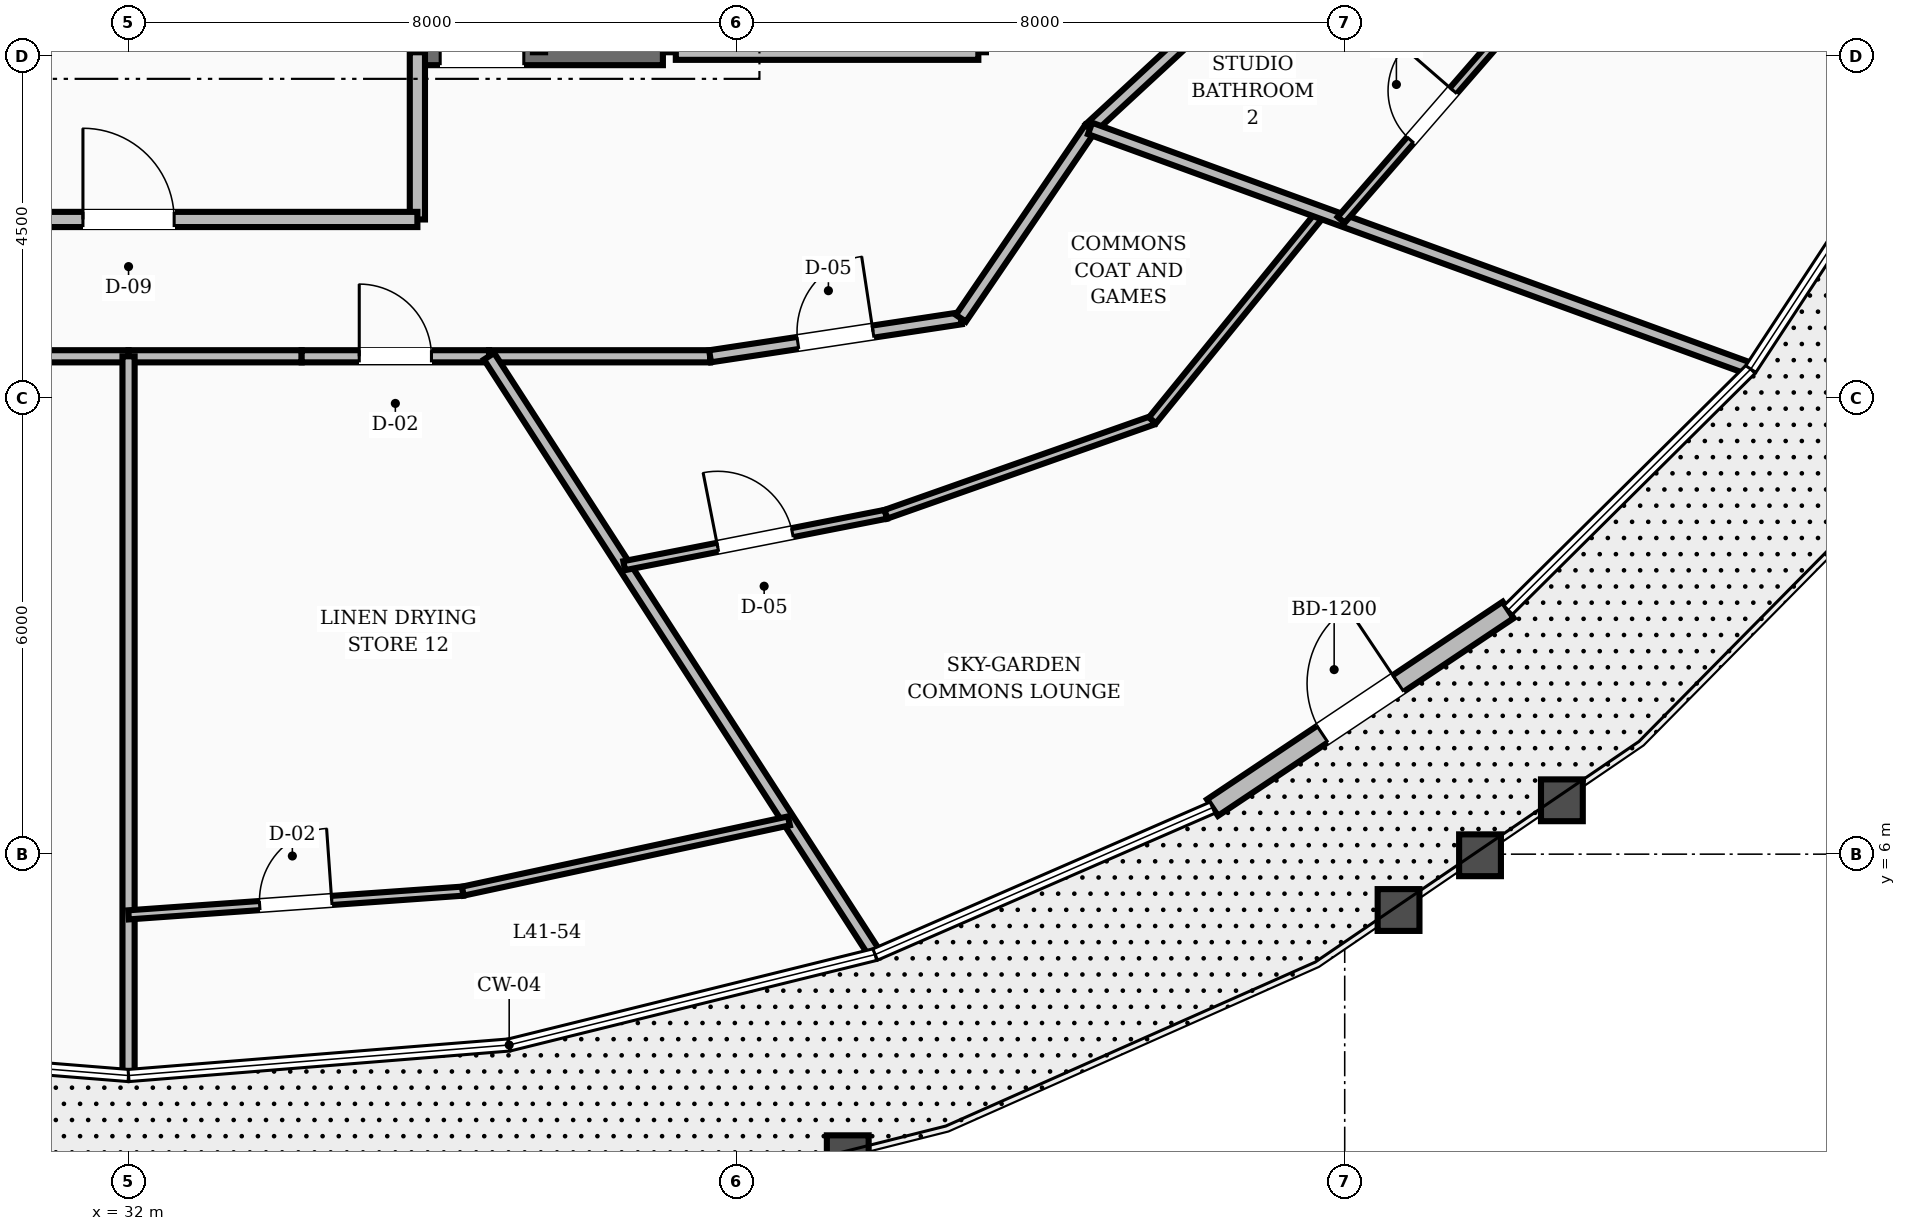
"""IFC4 building model, lengths in metres.
Left out: names, types, materials, properties, quantities, classifications, styles, units other than length and angle.
Written with IfcOpenShell. Run it as: python <this file> out.ifc"""

import sys

from ifc_helpers import new_model, si_unit, direction, frame, frame_2d, origin, place, context, subcontext, project, spatial, rectangle, extrude, element, fill, save


model = new_model("IFC4")
c1 = context("Model", 3, precision=1e-05, world=origin(), true_north=direction((0.0, 1.0)))
c2 = subcontext(c1, "Body", "Model", "MODEL_VIEW")
j1 = project(units=[si_unit("LENGTHUNIT", "METRE"), si_unit("PLANEANGLEUNIT", "RADIAN")], contexts=[c1])
p1 = place(None, origin())
s1 = spatial("IfcSite", under=j1, at=p1, CompositionType="ELEMENT")
p2 = place(p1, origin())
s2 = spatial("IfcBuilding", under=s1, at=p2, CompositionType="ELEMENT")
p3 = place(p2, frame((0.0, 0.0, 160.4)))
s3 = spatial("IfcBuildingStorey", under=s2, at=p3, CompositionType="ELEMENT", Elevation=160.4)
p4 = place(p3, frame((35.8, 16.55, 0.0), z_axis=(0.0, 0.0, 1.0), x_axis=(1.0, 0.0, 0.0)))
e1 = element("IfcWall", 1, at=p4, inside=s3, PredefinedType="SHEAR", context=c2, shape_type="SweptSolid", body=[
    extrude(rectangle(XDim=3.23, YDim=0.34, at=frame_2d((1.615, 0.0))), origin(), (0.0, 0.0, 1.0), 3.6),
])
p5 = place(p4, frame((0.3, 0.0, 0.0)))
e2 = element("IfcOpeningElement", 2, at=p5, cuts=e1, PredefinedType="OPENING", context=c2, shape_type="SweptSolid", body=[
    extrude(rectangle(XDim=1.1, YDim=2.1, at=frame_2d((0.55, 1.05))), frame((0.0, 0.18, 0.0), z_axis=(0.0, -1.0, 0.0), x_axis=(1.0, 0.0, 0.0)), (0.0, 0.0, 1.0), 0.36),
])
p6 = place(p3, frame((46.261, 6.612, 0.0), z_axis=(0.0, 0.0, 1.0), x_axis=(0.831303038132, 0.555819448015, 0.0)))
e3 = element("IfcWall", 3, at=p6, inside=s3, PredefinedType="STANDARD", context=c2, shape_type="SweptSolid", body=[
    extrude(rectangle(XDim=4.679, YDim=0.26, at=frame_2d((2.34, 0.0))), origin(), (0.0, 0.0, 1.0), 2.82),
])
p7 = place(p6, frame((1.74, 0.0, 0.0)))
e4 = element("IfcOpeningElement", 4, at=p7, cuts=e3, PredefinedType="OPENING", context=c2, shape_type="SweptSolid", body=[
    extrude(rectangle(XDim=1.2, YDim=2.15, at=frame_2d((0.6, 1.075))), frame((0.0, 0.14, 0.0), z_axis=(0.0, -1.0, 0.0), x_axis=(1.0, 0.0, 0.0)), (0.0, 0.0, 1.0), 0.28),
])
p8 = place(p3, frame((39.2, 16.55, 0.0), z_axis=(0.0, 0.0, 1.0), x_axis=(1.0, 0.0, 0.0)))
e5 = element("IfcWall", 5, at=p8, inside=s3, PredefinedType="SOLIDWALL", context=c2, shape_type="SweptSolid", body=[
    extrude(rectangle(XDim=3.98, YDim=0.2, at=frame_2d((1.99, 0.0))), origin(), (0.0, 0.0, 1.0), 2.8),
])
p9 = place(p3, frame((35.8, 14.35, 0.0), z_axis=(0.0, 0.0, 1.0), x_axis=(0.0, 1.0, 0.0)))
e6 = element("IfcWall", 6, at=p9, inside=s3, PredefinedType="SOLIDWALL", context=c2, shape_type="SweptSolid", body=[
    extrude(rectangle(XDim=2.2, YDim=0.2, at=frame_2d((1.1, 0.0))), origin(), (0.0, 0.0, 1.0), 2.8),
])
p10 = place(p3, frame((28.2, 14.35, 0.0), z_axis=(0.0, 0.0, 1.0), x_axis=(1.0, 0.0, 0.0)))
e7 = element("IfcWall", 7, at=p10, inside=s3, PredefinedType="SOLIDWALL", context=c2, shape_type="SweptSolid", body=[
    extrude(rectangle(XDim=7.6, YDim=0.2, at=frame_2d((3.8, 0.0))), origin(), (0.0, 0.0, 1.0), 2.8),
])
p11 = place(p10, frame((3.2, 0.0, 0.0)))
e8 = element("IfcOpeningElement", 8, at=p11, cuts=e7, PredefinedType="OPENING", context=c2, shape_type="SweptSolid", body=[
    extrude(rectangle(XDim=1.2, YDim=2.1, at=frame_2d((0.6, 1.05))), frame((0.0, 0.11, 0.0), z_axis=(0.0, -1.0, 0.0), x_axis=(1.0, 0.0, 0.0)), (0.0, 0.0, 1.0), 0.22),
])
for number, where, z_axis, x_axis in (
    (9, (29.722, 12.55, 0.0), (0.0, 0.0, 1.0), (1.0, 0.0, 0.0)),
    (10, (32.0, 12.55, 0.0), (0.0, 0.0, 1.0), (1.0, 0.0, 0.0)),
):
    element("IfcWall", number, at=place(p3, frame(where, z_axis=z_axis, x_axis=x_axis)), inside=s3, PredefinedType="SOLIDWALL", context=c2, shape_type="SweptSolid", body=[
        extrude(rectangle(XDim=2.278, YDim=0.16, at=frame_2d((1.139, 0.0))), origin(), (0.0, 0.0, 1.0), 2.8),
    ])
p12 = place(p3, frame((34.278, 12.55, 0.0), z_axis=(0.0, 0.0, 1.0), x_axis=(1.0, 0.0, 0.0)))
e11 = element("IfcWall", 11, at=p12, inside=s3, PredefinedType="SOLIDWALL", context=c2, shape_type="SweptSolid", body=[
    extrude(rectangle(XDim=2.465, YDim=0.16, at=frame_2d((1.232, 0.0))), origin(), (0.0, 0.0, 1.0), 2.8),
])
p13 = place(p12, frame((0.758, 0.0, 0.0)))
e12 = element("IfcOpeningElement", 12, at=p13, cuts=e11, PredefinedType="OPENING", context=c2, shape_type="SweptSolid", body=[
    extrude(rectangle(XDim=0.95, YDim=2.1, at=frame_2d((0.475, 1.05))), frame((0.0, 0.09, 0.0), z_axis=(0.0, -1.0, 0.0), x_axis=(1.0, 0.0, 0.0)), (0.0, 0.0, 1.0), 0.18),
])
p14 = place(p3, frame((36.743, 12.55, 0.0), z_axis=(0.0, 0.0, 1.0), x_axis=(1.0, 0.0, 0.0)))
e13 = element("IfcWall", 13, at=p14, inside=s3, PredefinedType="SOLIDWALL", context=c2, shape_type="SweptSolid", body=[
    extrude(rectangle(XDim=2.908, YDim=0.16, at=frame_2d((1.454, 0.0))), origin(), (0.0, 0.0, 1.0), 2.8),
])
p15 = place(p3, frame((39.651, 12.55, 0.0), z_axis=(0.0, 0.0, 1.0), x_axis=(0.988710906508, 0.149835721217, 0.0)))
e14 = element("IfcWall", 14, at=p15, inside=s3, PredefinedType="SOLIDWALL", context=c2, shape_type="SweptSolid", body=[
    extrude(rectangle(XDim=3.337, YDim=0.16, at=frame_2d((1.668, 0.0))), origin(), (0.0, 0.0, 1.0), 2.8),
])
p16 = place(p15, frame((1.168, 0.0, 0.0)))
e15 = element("IfcOpeningElement", 15, at=p16, cuts=e14, PredefinedType="OPENING", context=c2, shape_type="SweptSolid", body=[
    extrude(rectangle(XDim=1.0, YDim=2.1, at=frame_2d((0.5, 1.05))), frame((0.0, 0.09, 0.0), z_axis=(0.0, -1.0, 0.0), x_axis=(1.0, 0.0, 0.0)), (0.0, 0.0, 1.0), 0.18),
])
p17 = place(p3, frame((42.95, 13.05, 0.0), z_axis=(0.0, 0.0, 1.0), x_axis=(0.562674669208, 0.826678423955, 0.0)))
e16 = element("IfcWall", 16, at=p17, inside=s3, PredefinedType="SOLIDWALL", context=c2, shape_type="SweptSolid", body=[
    extrude(rectangle(XDim=3.021, YDim=0.16, at=frame_2d((1.511, 0.0))), origin(), (0.0, 0.0, 1.0), 2.8),
])
p18 = place(p3, frame((44.65, 15.548, 0.0), z_axis=(0.0, 0.0, 1.0), x_axis=(0.734347936521, 0.678773237633, 0.0)))
e17 = element("IfcWall", 17, at=p18, inside=s3, PredefinedType="SOLIDWALL", context=c2, shape_type="SweptSolid", body=[
    extrude(rectangle(XDim=3.268, YDim=0.16, at=frame_2d((1.634, 0.0))), origin(), (0.0, 0.0, 1.0), 2.8),
])
p19 = place(p3, frame((36.743, 12.55, 0.0), z_axis=(0.0, 0.0, 1.0), x_axis=(0.542328576717, -0.840166480453, 0.0)))
e18 = element("IfcWall", 18, at=p19, inside=s3, PredefinedType="SOLIDWALL", context=c2, shape_type="SweptSolid", body=[
    extrude(rectangle(XDim=9.318, YDim=0.16, at=frame_2d((4.659, 0.0))), origin(), (0.0, 0.0, 1.0), 2.8),
])
p20 = place(p3, frame((38.521, 9.795, 0.0), z_axis=(0.0, 0.0, 1.0), x_axis=(0.981254459405, 0.192716594764, 0.0)))
e19 = element("IfcWall", 19, at=p20, inside=s3, PredefinedType="PARTITIONING", context=c2, shape_type="SweptSolid", body=[
    extrude(rectangle(XDim=3.509, YDim=0.12, at=frame_2d((1.754, 0.0))), origin(), (0.0, 0.0, 1.0), 2.8),
])
p21 = place(p20, frame((1.255, 0.0, 0.0)))
e20 = element("IfcOpeningElement", 20, at=p21, cuts=e19, PredefinedType="OPENING", context=c2, shape_type="SweptSolid", body=[
    extrude(rectangle(XDim=1.0, YDim=2.1, at=frame_2d((0.5, 1.05))), frame((0.0, 0.07, 0.0), z_axis=(0.0, -1.0, 0.0), x_axis=(1.0, 0.0, 0.0)), (0.0, 0.0, 1.0), 0.14),
])
p22 = place(p3, frame((41.964, 10.472, 0.0), z_axis=(0.0, 0.0, 1.0), x_axis=(0.943167221186, 0.33231851119, 0.0)))
e21 = element("IfcWall", 21, at=p22, inside=s3, PredefinedType="PARTITIONING", context=c2, shape_type="SweptSolid", body=[
    extrude(rectangle(XDim=3.717, YDim=0.12, at=frame_2d((1.859, 0.0))), origin(), (0.0, 0.0, 1.0), 2.8),
])
p23 = place(p3, frame((45.47, 11.707, 0.0), z_axis=(0.0, 0.0, 1.0), x_axis=(0.630947475779, 0.775825549211, 0.0)))
e22 = element("IfcWall", 22, at=p23, inside=s3, PredefinedType="PARTITIONING", context=c2, shape_type="SweptSolid", body=[
    extrude(rectangle(XDim=3.522, YDim=0.12, at=frame_2d((1.761, 0.0))), origin(), (0.0, 0.0, 1.0), 2.8),
])
p24 = place(p3, frame((44.65, 15.548, 0.0), z_axis=(0.0, 0.0, 1.0), x_axis=(0.93962985892, -0.342192530934, 0.0)))
e23 = element("IfcWall", 23, at=p24, inside=s3, PredefinedType="SOLIDWALL", context=c2, shape_type="SweptSolid", body=[
    extrude(rectangle(XDim=9.201, YDim=0.16, at=frame_2d((4.601, 0.0))), origin(), (0.0, 0.0, 1.0), 2.8),
])
p25 = place(p3, frame((47.953, 14.344, 0.0), z_axis=(0.0, 0.0, 1.0), x_axis=(0.655948037825, 0.754806049044, 0.0)))
e24 = element("IfcWall", 24, at=p25, inside=s3, PredefinedType="PARTITIONING", context=c2, shape_type="SweptSolid", body=[
    extrude(rectangle(XDim=3.643, YDim=0.12, at=frame_2d((1.821, 0.0))), origin(), (0.0, 0.0, 1.0), 2.8),
])
p26 = place(p25, frame((1.391, 0.0, 0.0)))
e25 = element("IfcOpeningElement", 25, at=p26, cuts=e24, PredefinedType="OPENING", context=c2, shape_type="SweptSolid", body=[
    extrude(rectangle(XDim=0.86, YDim=2.1, at=frame_2d((0.43, 1.05))), frame((0.0, 0.07, 0.0), z_axis=(0.0, -1.0, 0.0), x_axis=(1.0, 0.0, 0.0)), (0.0, 0.0, 1.0), 0.14),
])
p27 = place(p3, frame((32.0, 12.55, 0.0), z_axis=(0.0, 0.0, 1.0), x_axis=(0.0, -1.0, 0.0)))
e26 = element("IfcWall", 26, at=p27, inside=s3, PredefinedType="SOLIDWALL", context=c2, shape_type="SweptSolid", body=[
    extrude(rectangle(XDim=9.412, YDim=0.16, at=frame_2d((4.706, 0.0))), origin(), (0.0, 0.0, 1.0), 2.8),
])
p28 = place(p3, frame((32.0, 5.201, 0.0), z_axis=(0.0, 0.0, 1.0), x_axis=(0.997492598999, 0.07077086224, 0.0)))
e27 = element("IfcWall", 27, at=p28, inside=s3, PredefinedType="PARTITIONING", context=c2, shape_type="SweptSolid", body=[
    extrude(rectangle(XDim=4.409, YDim=0.12, at=frame_2d((2.204, 0.0))), origin(), (0.0, 0.0, 1.0), 2.8),
])
p29 = place(p28, frame((1.729, 0.0, 0.0)))
e28 = element("IfcOpeningElement", 28, at=p29, cuts=e27, PredefinedType="OPENING", context=c2, shape_type="SweptSolid", body=[
    extrude(rectangle(XDim=0.95, YDim=2.1, at=frame_2d((0.475, 1.05))), frame((0.0, 0.07, 0.0), z_axis=(0.0, -1.0, 0.0), x_axis=(1.0, 0.0, 0.0)), (0.0, 0.0, 1.0), 0.14),
])
p30 = place(p3, frame((36.398, 5.513, 0.0), z_axis=(0.0, 0.0, 1.0), x_axis=(0.977569800654, 0.2106116921, 0.0)))
e29 = element("IfcWall", 29, at=p30, inside=s3, PredefinedType="PARTITIONING", context=c2, shape_type="SweptSolid", body=[
    extrude(rectangle(XDim=4.389, YDim=0.12, at=frame_2d((2.194, 0.0))), origin(), (0.0, 0.0, 1.0), 2.8),
])
p31 = place(p7, origin())
e30 = element("IfcDoor", 30, at=p31, inside=s3, OperationType="SINGLE_SWING_RIGHT", PredefinedType="DOOR", context=c2, shape_type="SweptSolid", body=[
    extrude(rectangle(XDim=1.2, YDim=2.15, at=frame_2d((0.6, 1.075))), frame((0.0, 0.025, 0.0), z_axis=(0.0, -1.0, 0.0), x_axis=(1.0, 0.0, 0.0)), (0.0, 0.0, 1.0), 0.05),
])
fill(e4, e30)
p32 = place(p5, origin())
e31 = element("IfcDoor", 31, at=p32, inside=s3, OperationType="SINGLE_SWING_RIGHT", PredefinedType="DOOR", context=c2, shape_type="SweptSolid", body=[
    extrude(rectangle(XDim=1.1, YDim=2.1, at=frame_2d((0.55, 1.05))), frame((0.0, 0.025, 0.0), z_axis=(0.0, -1.0, 0.0), x_axis=(1.0, 0.0, 0.0)), (0.0, 0.0, 1.0), 0.05),
])
fill(e2, e31)
p33 = place(p11, origin())
e32 = element("IfcDoor", 32, at=p33, inside=s3, OperationType="SINGLE_SWING_LEFT", PredefinedType="DOOR", context=c2, shape_type="SweptSolid", body=[
    extrude(rectangle(XDim=1.2, YDim=2.1, at=frame_2d((0.6, 1.05))), frame((0.0, 0.025, 0.0), z_axis=(0.0, -1.0, 0.0), x_axis=(1.0, 0.0, 0.0)), (0.0, 0.0, 1.0), 0.05),
])
fill(e8, e32)
p34 = place(p16, origin())
e33 = element("IfcDoor", 33, at=p34, inside=s3, OperationType="SINGLE_SWING_RIGHT", PredefinedType="DOOR", context=c2, shape_type="SweptSolid", body=[
    extrude(rectangle(XDim=1.0, YDim=2.1, at=frame_2d((0.5, 1.05))), frame((0.0, 0.025, 0.0), z_axis=(0.0, -1.0, 0.0), x_axis=(1.0, 0.0, 0.0)), (0.0, 0.0, 1.0), 0.05),
])
fill(e15, e33)
p35 = place(p21, origin())
e34 = element("IfcDoor", 34, at=p35, inside=s3, OperationType="SINGLE_SWING_LEFT", PredefinedType="DOOR", context=c2, shape_type="SweptSolid", body=[
    extrude(rectangle(XDim=1.0, YDim=2.1, at=frame_2d((0.5, 1.05))), frame((0.0, 0.025, 0.0), z_axis=(0.0, -1.0, 0.0), x_axis=(1.0, 0.0, 0.0)), (0.0, 0.0, 1.0), 0.05),
])
fill(e20, e34)
p36 = place(p26, origin())
e35 = element("IfcDoor", 35, at=p36, inside=s3, OperationType="SINGLE_SWING_RIGHT", PredefinedType="DOOR", context=c2, shape_type="SweptSolid", body=[
    extrude(rectangle(XDim=0.86, YDim=2.1, at=frame_2d((0.43, 1.05))), frame((0.0, 0.025, 0.0), z_axis=(0.0, -1.0, 0.0), x_axis=(1.0, 0.0, 0.0)), (0.0, 0.0, 1.0), 0.05),
])
fill(e25, e35)
p37 = place(p13, origin())
e36 = element("IfcDoor", 36, at=p37, inside=s3, OperationType="SINGLE_SWING_LEFT", PredefinedType="DOOR", context=c2, shape_type="SweptSolid", body=[
    extrude(rectangle(XDim=0.95, YDim=2.1, at=frame_2d((0.475, 1.05))), frame((0.0, 0.025, 0.0), z_axis=(0.0, -1.0, 0.0), x_axis=(1.0, 0.0, 0.0)), (0.0, 0.0, 1.0), 0.05),
])
fill(e12, e36)
p38 = place(p29, origin())
e37 = element("IfcDoor", 37, at=p38, inside=s3, OperationType="SINGLE_SWING_RIGHT", PredefinedType="DOOR", context=c2, shape_type="SweptSolid", body=[
    extrude(rectangle(XDim=0.95, YDim=2.1, at=frame_2d((0.475, 1.05))), frame((0.0, 0.025, 0.0), z_axis=(0.0, -1.0, 0.0), x_axis=(1.0, 0.0, 0.0)), (0.0, 0.0, 1.0), 0.05),
])
fill(e28, e37)
save(model, sys.argv[1])
